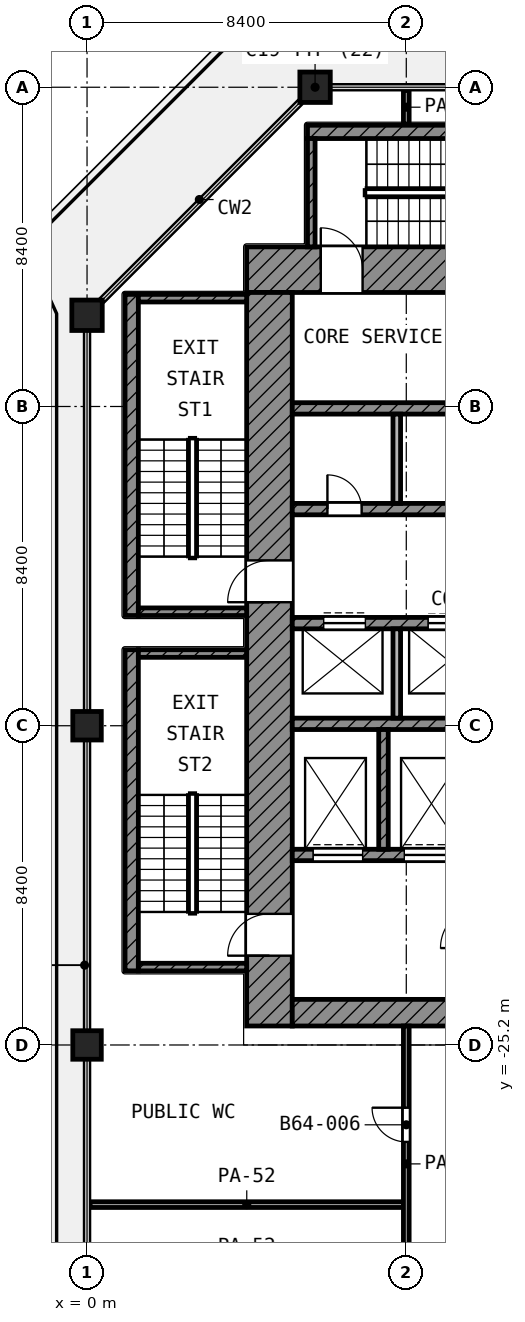
"""IFC4 building model, lengths in metres.
Left out: names, types, materials, properties, quantities, classifications, styles, units other than length and angle.
Written with IfcOpenShell. Run it as: python <this file> out.ifc"""

import sys

from ifc_helpers import new_model, si_unit, direction, frame, frame_2d, origin, origin_2d, place, context, subcontext, project, spatial, rectangle, extrude, element, fill, save


model = new_model("IFC4")
c1 = context("Model", 3, precision=1e-05, world=origin(), true_north=direction((0.0, 1.0)))
c2 = subcontext(c1, "Body", "Model", "MODEL_VIEW")
j1 = project(units=[si_unit("LENGTHUNIT", "METRE"), si_unit("PLANEANGLEUNIT", "RADIAN")], contexts=[c1])
p1 = place(None, origin())
s1 = spatial("IfcSite", under=j1, at=p1, CompositionType="ELEMENT")
p2 = place(p1, origin())
s2 = spatial("IfcBuilding", under=s1, at=p2, CompositionType="ELEMENT")
p3 = place(p2, frame((0.0, 0.0, 277.6)))
s3 = spatial("IfcBuildingStorey", under=s2, at=p3, CompositionType="ELEMENT", Elevation=277.6)
for number, where, z_axis, x_axis in (
    (1, (6.0, 0.0, 0.0), (0.0, 0.0, 1.0), (1.0, 0.0, 0.0)),
    (2, (0.0, -6.0, 0.0), (0.0, 0.0, 1.0), (1.0, 0.0, 0.0)),
):
    element("IfcColumn", number, at=place(p3, frame(where, z_axis=z_axis, x_axis=x_axis)), inside=s3, PredefinedType="COLUMN", context=c2, shape_type="SweptSolid", body=[
        extrude(rectangle(XDim=0.8, YDim=0.8, at=origin_2d()), origin(), (0.0, 0.0, 1.0), 4.2),
    ])
for number, where, z_axis, x_axis in (
    (3, (0.0, -16.8, 0.0), (0.0, 0.0, 1.0), (1.0, 0.0, 0.0)),
    (4, (0.0, -25.2, 0.0), (0.0, 0.0, 1.0), (1.0, 0.0, 0.0)),
):
    element("IfcColumn", number, at=place(p3, frame(where, z_axis=z_axis, x_axis=x_axis)), inside=s3, PredefinedType="COLUMN", context=c2, shape_type="SweptSolid", body=[
        extrude(rectangle(XDim=0.75, YDim=0.75, at=origin_2d()), origin(), (0.0, 0.0, 1.0), 4.2),
    ])
p4 = place(p3, frame((4.2, -4.8, 0.0), z_axis=(0.0, 0.0, 1.0), x_axis=(1.0, 0.0, 0.0)))
e5 = element("IfcWall", 5, at=p4, inside=s3, PredefinedType="SHEAR", context=c2, shape_type="SweptSolid", body=[
    extrude(rectangle(XDim=20.5, YDim=1.2, at=frame_2d((10.25, 0.0))), origin(), (0.0, 0.0, 1.0), 3.6),
])
p5 = place(p4, frame((1.95, 0.0, 0.0)))
e6 = element("IfcOpeningElement", 6, at=p5, cuts=e5, PredefinedType="OPENING", context=c2, shape_type="SweptSolid", body=[
    extrude(rectangle(XDim=1.1, YDim=2.1, at=frame_2d((0.55, 1.05))), frame((0.0, 0.61, 0.0), z_axis=(0.0, -1.0, 0.0), x_axis=(1.0, 0.0, 0.0)), (0.0, 0.0, 1.0), 1.22),
])
p6 = place(p4, frame((17.95, 0.0, 0.0)))
e7 = element("IfcOpeningElement", 7, at=p6, cuts=e5, PredefinedType="OPENING", context=c2, shape_type="SweptSolid", body=[
    extrude(rectangle(XDim=1.1, YDim=2.1, at=frame_2d((0.55, 1.05))), frame((0.0, 0.61, 0.0), z_axis=(0.0, -1.0, 0.0), x_axis=(1.0, 0.0, 0.0)), (0.0, 0.0, 1.0), 1.22),
])
p7 = place(p3, frame((4.8, -24.7, 0.0), z_axis=(0.0, 0.0, 1.0), x_axis=(0.0, 1.0, 0.0)))
e8 = element("IfcWall", 8, at=p7, inside=s3, PredefinedType="SHEAR", context=c2, shape_type="SweptSolid", body=[
    extrude(rectangle(XDim=19.3, YDim=1.2, at=frame_2d((9.65, 0.0))), origin(), (0.0, 0.0, 1.0), 3.6),
])
p8 = place(p7, frame((11.15, 0.0, 0.0)))
e9 = element("IfcOpeningElement", 9, at=p8, cuts=e8, PredefinedType="OPENING", context=c2, shape_type="SweptSolid", body=[
    extrude(rectangle(XDim=1.1, YDim=2.1, at=frame_2d((0.55, 1.05))), frame((0.0, 0.61, 0.0), z_axis=(0.0, -1.0, 0.0), x_axis=(1.0, 0.0, 0.0)), (0.0, 0.0, 1.0), 1.22),
])
p9 = place(p7, frame((1.85, 0.0, 0.0)))
e10 = element("IfcOpeningElement", 10, at=p9, cuts=e8, PredefinedType="OPENING", context=c2, shape_type="SweptSolid", body=[
    extrude(rectangle(XDim=1.1, YDim=2.1, at=frame_2d((0.55, 1.05))), frame((0.0, 0.61, 0.0), z_axis=(0.0, -1.0, 0.0), x_axis=(1.0, 0.0, 0.0)), (0.0, 0.0, 1.0), 1.22),
])
p10 = place(p3, frame((5.4, -24.35, 0.0), z_axis=(0.0, 0.0, 1.0), x_axis=(1.0, 0.0, 0.0)))
e11 = element("IfcWall", 11, at=p10, inside=s3, PredefinedType="SHEAR", context=c2, shape_type="SweptSolid", body=[
    extrude(rectangle(XDim=18.6, YDim=0.7, at=frame_2d((9.3, 0.0))), origin(), (0.0, 0.0, 1.0), 3.6),
])
p11 = place(p10, frame((6.3, 0.0, 0.0)))
e12 = element("IfcOpeningElement", 12, at=p11, cuts=e11, PredefinedType="OPENING", context=c2, shape_type="SweptSolid", body=[
    extrude(rectangle(XDim=1.8, YDim=2.1, at=frame_2d((0.9, 1.05))), frame((0.0, 0.36, 0.0), z_axis=(0.0, -1.0, 0.0), x_axis=(1.0, 0.0, 0.0)), (0.0, 0.0, 1.0), 0.72),
])
p12 = place(p3, frame((5.4, -8.45, 0.0), z_axis=(0.0, 0.0, 1.0), x_axis=(1.0, 0.0, 0.0)))
e13 = element("IfcWall", 13, at=p12, inside=s3, PredefinedType="SHEAR", context=c2, shape_type="SweptSolid", body=[
    extrude(rectangle(XDim=16.65, YDim=0.3, at=frame_2d((8.325, 0.0))), origin(), (0.0, 0.0, 1.0), 3.6),
])
p13 = place(p3, frame((5.4, -11.1, 0.0), z_axis=(0.0, 0.0, 1.0), x_axis=(1.0, 0.0, 0.0)))
e14 = element("IfcWall", 14, at=p13, inside=s3, PredefinedType="SHEAR", context=c2, shape_type="SweptSolid", body=[
    extrude(rectangle(XDim=16.65, YDim=0.3, at=frame_2d((8.325, 0.0))), origin(), (0.0, 0.0, 1.0), 3.6),
])
p14 = place(p13, frame((11.825, 0.0, 0.0)))
e15 = element("IfcOpeningElement", 15, at=p14, cuts=e14, PredefinedType="OPENING", context=c2, shape_type="SweptSolid", body=[
    extrude(rectangle(XDim=1.1, YDim=2.1, at=frame_2d((0.55, 1.05))), frame((0.0, 0.16, 0.0), z_axis=(0.0, -1.0, 0.0), x_axis=(1.0, 0.0, 0.0)), (0.0, 0.0, 1.0), 0.32),
])
p15 = place(p13, frame((14.575, 0.0, 0.0)))
e16 = element("IfcOpeningElement", 16, at=p15, cuts=e14, PredefinedType="OPENING", context=c2, shape_type="SweptSolid", body=[
    extrude(rectangle(XDim=1.1, YDim=2.1, at=frame_2d((0.55, 1.05))), frame((0.0, 0.16, 0.0), z_axis=(0.0, -1.0, 0.0), x_axis=(1.0, 0.0, 0.0)), (0.0, 0.0, 1.0), 0.32),
])
p16 = place(p13, frame((0.925, 0.0, 0.0)))
e17 = element("IfcOpeningElement", 17, at=p16, cuts=e14, PredefinedType="OPENING", context=c2, shape_type="SweptSolid", body=[
    extrude(rectangle(XDim=0.9, YDim=2.1, at=frame_2d((0.45, 1.05))), frame((0.0, 0.16, 0.0), z_axis=(0.0, -1.0, 0.0), x_axis=(1.0, 0.0, 0.0)), (0.0, 0.0, 1.0), 0.32),
])
p17 = place(p13, frame((6.425, 0.0, 0.0)))
e18 = element("IfcOpeningElement", 18, at=p17, cuts=e14, PredefinedType="OPENING", context=c2, shape_type="SweptSolid", body=[
    extrude(rectangle(XDim=0.9, YDim=2.1, at=frame_2d((0.45, 1.05))), frame((0.0, 0.16, 0.0), z_axis=(0.0, -1.0, 0.0), x_axis=(1.0, 0.0, 0.0)), (0.0, 0.0, 1.0), 0.32),
])
p18 = place(p3, frame((5.4, -14.1, 0.0), z_axis=(0.0, 0.0, 1.0), x_axis=(1.0, 0.0, 0.0)))
e19 = element("IfcWall", 19, at=p18, inside=s3, PredefinedType="SHEAR", context=c2, shape_type="SweptSolid", body=[
    extrude(rectangle(XDim=16.65, YDim=0.3, at=frame_2d((8.325, 0.0))), origin(), (0.0, 0.0, 1.0), 3.6),
])
p19 = place(p18, frame((0.825, 0.0, 0.0)))
e20 = element("IfcOpeningElement", 20, at=p19, cuts=e19, PredefinedType="OPENING", context=c2, shape_type="SweptSolid", body=[
    extrude(rectangle(XDim=1.1, YDim=2.1, at=frame_2d((0.55, 1.05))), frame((0.0, 0.16, 0.0), z_axis=(0.0, -1.0, 0.0), x_axis=(1.0, 0.0, 0.0)), (0.0, 0.0, 1.0), 0.32),
])
p20 = place(p18, frame((3.575, 0.0, 0.0)))
e21 = element("IfcOpeningElement", 21, at=p20, cuts=e19, PredefinedType="OPENING", context=c2, shape_type="SweptSolid", body=[
    extrude(rectangle(XDim=1.1, YDim=2.1, at=frame_2d((0.55, 1.05))), frame((0.0, 0.16, 0.0), z_axis=(0.0, -1.0, 0.0), x_axis=(1.0, 0.0, 0.0)), (0.0, 0.0, 1.0), 0.32),
])
p21 = place(p18, frame((6.325, 0.0, 0.0)))
e22 = element("IfcOpeningElement", 22, at=p21, cuts=e19, PredefinedType="OPENING", context=c2, shape_type="SweptSolid", body=[
    extrude(rectangle(XDim=1.1, YDim=2.1, at=frame_2d((0.55, 1.05))), frame((0.0, 0.16, 0.0), z_axis=(0.0, -1.0, 0.0), x_axis=(1.0, 0.0, 0.0)), (0.0, 0.0, 1.0), 0.32),
])
p22 = place(p18, frame((9.075, 0.0, 0.0)))
e23 = element("IfcOpeningElement", 23, at=p22, cuts=e19, PredefinedType="OPENING", context=c2, shape_type="SweptSolid", body=[
    extrude(rectangle(XDim=1.1, YDim=2.1, at=frame_2d((0.55, 1.05))), frame((0.0, 0.16, 0.0), z_axis=(0.0, -1.0, 0.0), x_axis=(1.0, 0.0, 0.0)), (0.0, 0.0, 1.0), 0.32),
])
p23 = place(p18, frame((11.825, 0.0, 0.0)))
e24 = element("IfcOpeningElement", 24, at=p23, cuts=e19, PredefinedType="OPENING", context=c2, shape_type="SweptSolid", body=[
    extrude(rectangle(XDim=1.1, YDim=2.1, at=frame_2d((0.55, 1.05))), frame((0.0, 0.16, 0.0), z_axis=(0.0, -1.0, 0.0), x_axis=(1.0, 0.0, 0.0)), (0.0, 0.0, 1.0), 0.32),
])
p24 = place(p18, frame((14.575, 0.0, 0.0)))
e25 = element("IfcOpeningElement", 25, at=p24, cuts=e19, PredefinedType="OPENING", context=c2, shape_type="SweptSolid", body=[
    extrude(rectangle(XDim=1.1, YDim=2.1, at=frame_2d((0.55, 1.05))), frame((0.0, 0.16, 0.0), z_axis=(0.0, -1.0, 0.0), x_axis=(1.0, 0.0, 0.0)), (0.0, 0.0, 1.0), 0.32),
])
p25 = place(p3, frame((5.4, -16.75, 0.0), z_axis=(0.0, 0.0, 1.0), x_axis=(1.0, 0.0, 0.0)))
e26 = element("IfcWall", 26, at=p25, inside=s3, PredefinedType="SHEAR", context=c2, shape_type="SweptSolid", body=[
    extrude(rectangle(XDim=16.65, YDim=0.3, at=frame_2d((8.325, 0.0))), origin(), (0.0, 0.0, 1.0), 3.6),
])
p26 = place(p3, frame((5.4, -20.2, 0.0), z_axis=(0.0, 0.0, 1.0), x_axis=(1.0, 0.0, 0.0)))
e27 = element("IfcWall", 27, at=p26, inside=s3, PredefinedType="SHEAR", context=c2, shape_type="SweptSolid", body=[
    extrude(rectangle(XDim=14.65, YDim=0.3, at=frame_2d((7.325, 0.0))), origin(), (0.0, 0.0, 1.0), 3.6),
])
p27 = place(p26, frame((10.55, 0.0, 0.0)))
e28 = element("IfcOpeningElement", 28, at=p27, cuts=e27, PredefinedType="OPENING", context=c2, shape_type="SweptSolid", body=[
    extrude(rectangle(XDim=1.3, YDim=2.1, at=frame_2d((0.65, 1.05))), frame((0.0, 0.16, 0.0), z_axis=(0.0, -1.0, 0.0), x_axis=(1.0, 0.0, 0.0)), (0.0, 0.0, 1.0), 0.32),
])
p28 = place(p26, frame((12.95, 0.0, 0.0)))
e29 = element("IfcOpeningElement", 29, at=p28, cuts=e27, PredefinedType="OPENING", context=c2, shape_type="SweptSolid", body=[
    extrude(rectangle(XDim=1.3, YDim=2.1, at=frame_2d((0.65, 1.05))), frame((0.0, 0.16, 0.0), z_axis=(0.0, -1.0, 0.0), x_axis=(1.0, 0.0, 0.0)), (0.0, 0.0, 1.0), 0.32),
])
p29 = place(p26, frame((0.55, 0.0, 0.0)))
e30 = element("IfcOpeningElement", 30, at=p29, cuts=e27, PredefinedType="OPENING", context=c2, shape_type="SweptSolid", body=[
    extrude(rectangle(XDim=1.3, YDim=2.1, at=frame_2d((0.65, 1.05))), frame((0.0, 0.16, 0.0), z_axis=(0.0, -1.0, 0.0), x_axis=(1.0, 0.0, 0.0)), (0.0, 0.0, 1.0), 0.32),
])
p30 = place(p26, frame((2.95, 0.0, 0.0)))
e31 = element("IfcOpeningElement", 31, at=p30, cuts=e27, PredefinedType="OPENING", context=c2, shape_type="SweptSolid", body=[
    extrude(rectangle(XDim=1.3, YDim=2.1, at=frame_2d((0.65, 1.05))), frame((0.0, 0.16, 0.0), z_axis=(0.0, -1.0, 0.0), x_axis=(1.0, 0.0, 0.0)), (0.0, 0.0, 1.0), 0.32),
])
p31 = place(p26, frame((5.35, 0.0, 0.0)))
e32 = element("IfcOpeningElement", 32, at=p31, cuts=e27, PredefinedType="OPENING", context=c2, shape_type="SweptSolid", body=[
    extrude(rectangle(XDim=0.9, YDim=2.1, at=frame_2d((0.45, 1.05))), frame((0.0, 0.16, 0.0), z_axis=(0.0, -1.0, 0.0), x_axis=(1.0, 0.0, 0.0)), (0.0, 0.0, 1.0), 0.32),
])
p32 = place(p26, frame((7.75, 0.0, 0.0)))
e33 = element("IfcOpeningElement", 33, at=p32, cuts=e27, PredefinedType="OPENING", context=c2, shape_type="SweptSolid", body=[
    extrude(rectangle(XDim=0.9, YDim=2.1, at=frame_2d((0.45, 1.05))), frame((0.0, 0.16, 0.0), z_axis=(0.0, -1.0, 0.0), x_axis=(1.0, 0.0, 0.0)), (0.0, 0.0, 1.0), 0.32),
])
p33 = place(p3, frame((7.8, -20.05, 0.0), z_axis=(0.0, 0.0, 1.0), x_axis=(0.0, 1.0, 0.0)))
e34 = element("IfcWall", 34, at=p33, inside=s3, PredefinedType="SHEAR", context=c2, shape_type="SweptSolid", body=[
    extrude(rectangle(XDim=3.15, YDim=0.25, at=frame_2d((1.575, 0.0))), origin(), (0.0, 0.0, 1.0), 3.6),
])
p34 = place(p3, frame((8.15, -10.95, 0.0), z_axis=(0.0, 0.0, 1.0), x_axis=(0.0, 1.0, 0.0)))
e35 = element("IfcWall", 35, at=p34, inside=s3, PredefinedType="PARTITIONING", context=c2, shape_type="SweptSolid", body=[
    extrude(rectangle(XDim=2.35, YDim=0.2, at=frame_2d((1.175, 0.0))), origin(), (0.0, 0.0, 1.0), 3.6),
])
p35 = place(p3, frame((8.15, -16.6, 0.0), z_axis=(0.0, 0.0, 1.0), x_axis=(0.0, 1.0, 0.0)))
e36 = element("IfcWall", 36, at=p35, inside=s3, PredefinedType="PARTITIONING", context=c2, shape_type="SweptSolid", body=[
    extrude(rectangle(XDim=2.35, YDim=0.2, at=frame_2d((1.175, 0.0))), origin(), (0.0, 0.0, 1.0), 3.6),
])
p36 = place(p3, frame((1.175, -13.9, 0.0), z_axis=(0.0, 0.0, 1.0), x_axis=(0.0, 1.0, 0.0)))
e37 = element("IfcWall", 37, at=p36, inside=s3, PredefinedType="SHEAR", context=c2, shape_type="SweptSolid", body=[
    extrude(rectangle(XDim=8.45, YDim=0.35, at=frame_2d((4.225, 0.0))), origin(), (0.0, 0.0, 1.0), 3.6),
])
for number, where, z_axis, x_axis in (
    (38, (1.35, -5.55, 0.0), (0.0, 0.0, 1.0), (1.0, 0.0, 0.0)),
    (39, (1.35, -13.8, 0.0), (0.0, 0.0, 1.0), (1.0, 0.0, 0.0)),
):
    element("IfcWall", number, at=place(p3, frame(where, z_axis=z_axis, x_axis=x_axis)), inside=s3, PredefinedType="SHEAR", context=c2, shape_type="SweptSolid", body=[
        extrude(rectangle(XDim=2.85, YDim=0.2, at=frame_2d((1.425, 0.0))), origin(), (0.0, 0.0, 1.0), 3.6),
    ])
p37 = place(p3, frame((1.175, -23.25, 0.0), z_axis=(0.0, 0.0, 1.0), x_axis=(0.0, 1.0, 0.0)))
e40 = element("IfcWall", 40, at=p37, inside=s3, PredefinedType="SHEAR", context=c2, shape_type="SweptSolid", body=[
    extrude(rectangle(XDim=8.45, YDim=0.35, at=frame_2d((4.225, 0.0))), origin(), (0.0, 0.0, 1.0), 3.6),
])
for number, where, z_axis, x_axis in (
    (41, (1.35, -14.9, 0.0), (0.0, 0.0, 1.0), (1.0, 0.0, 0.0)),
    (42, (1.35, -23.15, 0.0), (0.0, 0.0, 1.0), (1.0, 0.0, 0.0)),
):
    element("IfcWall", number, at=place(p3, frame(where, z_axis=z_axis, x_axis=x_axis)), inside=s3, PredefinedType="SHEAR", context=c2, shape_type="SweptSolid", body=[
        extrude(rectangle(XDim=2.85, YDim=0.2, at=frame_2d((1.425, 0.0))), origin(), (0.0, 0.0, 1.0), 3.6),
    ])
p38 = place(p3, frame((5.8, -1.175, 0.0), z_axis=(0.0, 0.0, 1.0), x_axis=(1.0, 0.0, 0.0)))
e43 = element("IfcWall", 43, at=p38, inside=s3, PredefinedType="SHEAR", context=c2, shape_type="SweptSolid", body=[
    extrude(rectangle(XDim=8.45, YDim=0.35, at=frame_2d((4.225, 0.0))), origin(), (0.0, 0.0, 1.0), 3.6),
])
p39 = place(p3, frame((5.9, -4.2, 0.0), z_axis=(0.0, 0.0, 1.0), x_axis=(0.0, 1.0, 0.0)))
e44 = element("IfcWall", 44, at=p39, inside=s3, PredefinedType="SHEAR", context=c2, shape_type="SweptSolid", body=[
    extrude(rectangle(XDim=2.85, YDim=0.2, at=frame_2d((1.425, 0.0))), origin(), (0.0, 0.0, 1.0), 3.6),
])
p40 = place(p3, frame((0.08, -29.4, 0.0), z_axis=(0.0, 0.0, 1.0), x_axis=(1.0, 0.0, 0.0)))
e45 = element("IfcWall", 45, at=p40, inside=s3, PredefinedType="PARTITIONING", context=c2, shape_type="SweptSolid", body=[
    extrude(rectangle(XDim=8.245, YDim=0.15, at=frame_2d((4.123, 0.0))), origin(), (0.0, 0.0, 1.0), 2.7),
])
p41 = place(p3, frame((8.4, -31.957, 0.0), z_axis=(0.0, 0.0, 1.0), x_axis=(0.0, 1.0, 0.0)))
e46 = element("IfcWall", 46, at=p41, inside=s3, PredefinedType="PARTITIONING", context=c2, shape_type="SweptSolid", body=[
    extrude(rectangle(XDim=7.257, YDim=0.15, at=frame_2d((3.628, 0.0))), origin(), (0.0, 0.0, 1.0), 3.6),
])
p42 = place(p41, frame((4.207, 0.0, 0.0)))
e47 = element("IfcOpeningElement", 47, at=p42, cuts=e46, PredefinedType="OPENING", context=c2, shape_type="SweptSolid", body=[
    extrude(rectangle(XDim=0.9, YDim=2.1, at=frame_2d((0.45, 1.05))), frame((0.0, 0.085, 0.0), z_axis=(0.0, -1.0, 0.0), x_axis=(1.0, 0.0, 0.0)), (0.0, 0.0, 1.0), 0.17),
])
p43 = place(p3, frame((8.4, -0.97, 0.0), z_axis=(0.0, 0.0, 1.0), x_axis=(0.0, 1.0, 0.0)))
e48 = element("IfcWall", 48, at=p43, inside=s3, PredefinedType="PARTITIONING", context=c2, shape_type="SweptSolid", body=[
    extrude(rectangle(XDim=0.89, YDim=0.15, at=frame_2d((0.445, 0.0))), origin(), (0.0, 0.0, 1.0), 3.6),
])
p44 = place(p19, origin())
e49 = element("IfcDoor", 49, at=p44, inside=s3, OperationType="DOUBLE_DOOR_SLIDING", PredefinedType="DOOR", context=c2, shape_type="SweptSolid", body=[
    extrude(rectangle(XDim=1.1, YDim=2.1, at=frame_2d((0.55, 1.05))), frame((0.0, 0.025, 0.0), z_axis=(0.0, -1.0, 0.0), x_axis=(1.0, 0.0, 0.0)), (0.0, 0.0, 1.0), 0.05),
])
fill(e20, e49)
p45 = place(p20, origin())
e50 = element("IfcDoor", 50, at=p45, inside=s3, OperationType="DOUBLE_DOOR_SLIDING", PredefinedType="DOOR", context=c2, shape_type="SweptSolid", body=[
    extrude(rectangle(XDim=1.1, YDim=2.1, at=frame_2d((0.55, 1.05))), frame((0.0, 0.025, 0.0), z_axis=(0.0, -1.0, 0.0), x_axis=(1.0, 0.0, 0.0)), (0.0, 0.0, 1.0), 0.05),
])
fill(e21, e50)
p46 = place(p29, origin())
e51 = element("IfcDoor", 51, at=p46, inside=s3, OperationType="DOUBLE_DOOR_SLIDING", PredefinedType="DOOR", context=c2, shape_type="SweptSolid", body=[
    extrude(rectangle(XDim=1.3, YDim=2.1, at=frame_2d((0.65, 1.05))), frame((0.0, 0.025, 0.0), z_axis=(0.0, -1.0, 0.0), x_axis=(1.0, 0.0, 0.0)), (0.0, 0.0, 1.0), 0.05),
])
fill(e30, e51)
p47 = place(p30, origin())
e52 = element("IfcDoor", 52, at=p47, inside=s3, OperationType="DOUBLE_DOOR_SLIDING", PredefinedType="DOOR", context=c2, shape_type="SweptSolid", body=[
    extrude(rectangle(XDim=1.3, YDim=2.1, at=frame_2d((0.65, 1.05))), frame((0.0, 0.025, 0.0), z_axis=(0.0, -1.0, 0.0), x_axis=(1.0, 0.0, 0.0)), (0.0, 0.0, 1.0), 0.05),
])
fill(e31, e52)
p48 = place(p8, origin())
e53 = element("IfcDoor", 53, at=p48, inside=s3, OperationType="SINGLE_SWING_LEFT", PredefinedType="DOOR", context=c2, shape_type="SweptSolid", body=[
    extrude(rectangle(XDim=1.1, YDim=2.1, at=frame_2d((0.55, 1.05))), frame((0.0, 0.025, 0.0), z_axis=(0.0, -1.0, 0.0), x_axis=(1.0, 0.0, 0.0)), (0.0, 0.0, 1.0), 0.05),
])
fill(e9, e53)
p49 = place(p9, origin())
e54 = element("IfcDoor", 54, at=p49, inside=s3, OperationType="SINGLE_SWING_LEFT", PredefinedType="DOOR", context=c2, shape_type="SweptSolid", body=[
    extrude(rectangle(XDim=1.1, YDim=2.1, at=frame_2d((0.55, 1.05))), frame((0.0, 0.025, 0.0), z_axis=(0.0, -1.0, 0.0), x_axis=(1.0, 0.0, 0.0)), (0.0, 0.0, 1.0), 0.05),
])
fill(e10, e54)
p50 = place(p5, origin())
e55 = element("IfcDoor", 55, at=p50, inside=s3, OperationType="SINGLE_SWING_LEFT", PredefinedType="DOOR", context=c2, shape_type="SweptSolid", body=[
    extrude(rectangle(XDim=1.1, YDim=2.1, at=frame_2d((0.55, 1.05))), frame((0.0, 0.025, 0.0), z_axis=(0.0, -1.0, 0.0), x_axis=(1.0, 0.0, 0.0)), (0.0, 0.0, 1.0), 0.05),
])
fill(e6, e55)
p51 = place(p16, origin())
e56 = element("IfcDoor", 56, at=p51, inside=s3, OperationType="SINGLE_SWING_LEFT", PredefinedType="DOOR", context=c2, shape_type="SweptSolid", body=[
    extrude(rectangle(XDim=0.9, YDim=2.1, at=frame_2d((0.45, 1.05))), frame((0.0, 0.025, 0.0), z_axis=(0.0, -1.0, 0.0), x_axis=(1.0, 0.0, 0.0)), (0.0, 0.0, 1.0), 0.05),
])
fill(e17, e56)
p52 = place(p42, origin())
e57 = element("IfcDoor", 57, at=p52, inside=s3, OperationType="SINGLE_SWING_RIGHT", PredefinedType="DOOR", context=c2, shape_type="SweptSolid", body=[
    extrude(rectangle(XDim=0.9, YDim=2.1, at=frame_2d((0.45, 1.05))), frame((0.0, 0.025, 0.0), z_axis=(0.0, -1.0, 0.0), x_axis=(1.0, 0.0, 0.0)), (0.0, 0.0, 1.0), 0.05),
])
fill(e47, e57)
save(model, sys.argv[1])
